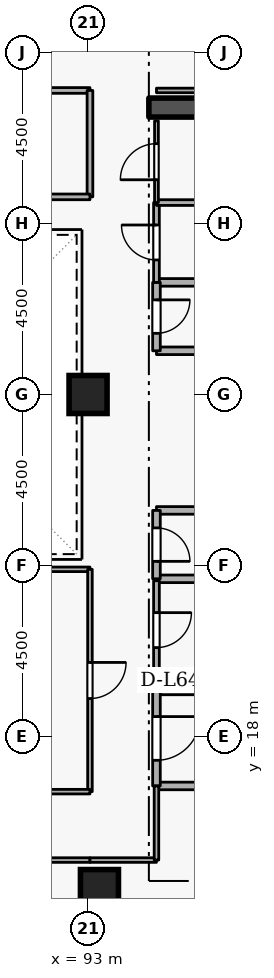
"""IFC4 building model, lengths in metres.
Left out: names, types, materials, properties, quantities, classifications, styles, units other than length and angle.
Written with IfcOpenShell. Run it as: python <this file> out.ifc"""

import sys

from ifc_helpers import new_model, si_unit, direction, frame, frame_2d, origin, origin_2d, place, context, subcontext, project, spatial, rectangle, extrude, element, fill, save


model = new_model("IFC4")
c1 = context("Model", 3, precision=1e-05, world=origin(), true_north=direction((0.0, 1.0)))
c2 = subcontext(c1, "Body", "Model", "MODEL_VIEW")
j1 = project(units=[si_unit("LENGTHUNIT", "METRE"), si_unit("PLANEANGLEUNIT", "RADIAN")], contexts=[c1])
p1 = place(None, origin())
s1 = spatial("IfcSite", under=j1, at=p1, CompositionType="ELEMENT")
p2 = place(p1, origin())
s2 = spatial("IfcBuilding", under=s1, at=p2, CompositionType="ELEMENT")
p3 = place(p2, frame((0.0, 0.0, 240.3)))
s3 = spatial("IfcBuildingStorey", under=s2, at=p3, CompositionType="ELEMENT", Elevation=240.3)
p4 = place(p3, frame((94.6, 34.55, 0.0), z_axis=(0.0, 0.0, 1.0), x_axis=(1.0, 0.0, 0.0)))
e1 = element("IfcWall", 1, at=p4, inside=s3, PredefinedType="SHEAR", context=c2, shape_type="SweptSolid", body=[
    extrude(rectangle(XDim=5.8, YDim=0.5, at=frame_2d((2.9, 0.0))), origin(), (0.0, 0.0, 1.0), 3.6),
])
for number, where, z_axis, x_axis in (
    (2, (93.3, 14.0, 0.0), (0.0, 0.0, 1.0), (1.0, 0.0, 0.0)),
    (3, (93.0, 27.0, 0.0), (0.0, 0.0, 1.0), (1.0, 0.0, 0.0)),
):
    element("IfcColumn", number, at=place(p3, frame(where, z_axis=z_axis, x_axis=x_axis)), inside=s3, PredefinedType="COLUMN", context=c2, shape_type="SweptSolid", body=[
        extrude(rectangle(XDim=1.0, YDim=1.0, at=origin_2d()), origin(), (0.0, 0.0, 1.0), 3.6),
    ])
p5 = place(p3, frame((94.8, 16.7, 0.0), z_axis=(0.0, 0.0, 1.0), x_axis=(1.0, 0.0, 0.0)))
e4 = element("IfcWall", 4, at=p5, inside=s3, PredefinedType="STANDARD", context=c2, shape_type="SweptSolid", body=[
    extrude(rectangle(XDim=5.7, YDim=0.2, at=frame_2d((2.85, 0.0))), origin(), (0.0, 0.0, 1.0), 3.34),
])
p6 = place(p3, frame((97.1, 19.2, 0.0), z_axis=(0.0, 0.0, 1.0), x_axis=(-1.0, 0.0, 0.0)))
e5 = element("IfcWall", 5, at=p6, inside=s3, PredefinedType="STANDARD", context=c2, shape_type="SweptSolid", body=[
    extrude(rectangle(XDim=2.3, YDim=0.2, at=frame_2d((1.15, 0.0))), origin(), (0.0, 0.0, 1.0), 2.545),
])
p7 = place(p3, frame((94.8, 19.2, 0.0), z_axis=(0.0, 0.0, 1.0), x_axis=(0.0, -1.0, 0.0)))
e6 = element("IfcWall", 6, at=p7, inside=s3, PredefinedType="STANDARD", context=c2, shape_type="SweptSolid", body=[
    extrude(rectangle(XDim=2.5, YDim=0.2, at=frame_2d((1.25, 0.0))), origin(), (0.0, 0.0, 1.0), 3.34),
])
p8 = place(p7, frame((0.675, 0.0, 0.0)))
e7 = element("IfcOpeningElement", 7, at=p8, cuts=e6, PredefinedType="OPENING", context=c2, shape_type="SweptSolid", body=[
    extrude(rectangle(XDim=1.15, YDim=2.1, at=frame_2d((0.575, 1.05))), frame((0.0, 0.11, 0.0), z_axis=(0.0, -1.0, 0.0), x_axis=(1.0, 0.0, 0.0)), (0.0, 0.0, 1.0), 0.22),
])
for number, where, z_axis, x_axis in (
    (8, (94.8, 28.15, 0.0), (0.0, 0.0, 1.0), (1.0, 0.0, 0.0)),
    (9, (96.85, 29.95, 0.0), (0.0, 0.0, 1.0), (-1.0, 0.0, 0.0)),
):
    element("IfcWall", number, at=place(p3, frame(where, z_axis=z_axis, x_axis=x_axis)), inside=s3, PredefinedType="STANDARD", context=c2, shape_type="SweptSolid", body=[
        extrude(rectangle(XDim=2.05, YDim=0.2, at=frame_2d((1.025, 0.0))), origin(), (0.0, 0.0, 1.0), 3.34),
    ])
p9 = place(p3, frame((94.8, 29.95, 0.0), z_axis=(0.0, 0.0, 1.0), x_axis=(0.0, -1.0, 0.0)))
e10 = element("IfcWall", 10, at=p9, inside=s3, PredefinedType="STANDARD", context=c2, shape_type="SweptSolid", body=[
    extrude(rectangle(XDim=1.8, YDim=0.2, at=frame_2d((0.9, 0.0))), origin(), (0.0, 0.0, 1.0), 3.34),
])
p10 = place(p9, frame((0.46, 0.0, 0.0)))
e11 = element("IfcOpeningElement", 11, at=p10, cuts=e10, PredefinedType="OPENING", context=c2, shape_type="SweptSolid", body=[
    extrude(rectangle(XDim=0.88, YDim=2.04, at=frame_2d((0.44, 1.02))), frame((0.0, 0.11, 0.0), z_axis=(0.0, -1.0, 0.0), x_axis=(1.0, 0.0, 0.0)), (0.0, 0.0, 1.0), 0.22),
])
for number, where, z_axis, x_axis in (
    (12, (94.8, 22.15, 0.0), (0.0, 0.0, 1.0), (1.0, 0.0, 0.0)),
    (13, (96.85, 23.95, 0.0), (0.0, 0.0, 1.0), (-1.0, 0.0, 0.0)),
):
    element("IfcWall", number, at=place(p3, frame(where, z_axis=z_axis, x_axis=x_axis)), inside=s3, PredefinedType="STANDARD", context=c2, shape_type="SweptSolid", body=[
        extrude(rectangle(XDim=2.05, YDim=0.2, at=frame_2d((1.025, 0.0))), origin(), (0.0, 0.0, 1.0), 3.34),
    ])
p11 = place(p3, frame((94.8, 23.95, 0.0), z_axis=(0.0, 0.0, 1.0), x_axis=(0.0, -1.0, 0.0)))
e14 = element("IfcWall", 14, at=p11, inside=s3, PredefinedType="STANDARD", context=c2, shape_type="SweptSolid", body=[
    extrude(rectangle(XDim=1.8, YDim=0.2, at=frame_2d((0.9, 0.0))), origin(), (0.0, 0.0, 1.0), 3.34),
])
p12 = place(p11, frame((0.46, 0.0, 0.0)))
e15 = element("IfcOpeningElement", 15, at=p12, cuts=e14, PredefinedType="OPENING", context=c2, shape_type="SweptSolid", body=[
    extrude(rectangle(XDim=0.88, YDim=2.04, at=frame_2d((0.44, 1.02))), frame((0.0, 0.11, 0.0), z_axis=(0.0, -1.0, 0.0), x_axis=(1.0, 0.0, 0.0)), (0.0, 0.0, 1.0), 0.22),
])
p13 = place(p3, frame((94.8, 19.5, 0.0), z_axis=(0.0, 0.0, 1.0), x_axis=(1.0, 0.0, 0.0)))
e16 = element("IfcWall", 16, at=p13, inside=s3, PredefinedType="PARTITIONING", context=c2, shape_type="SweptSolid", body=[
    extrude(rectangle(XDim=2.05, YDim=0.15, at=frame_2d((1.025, 0.0))), origin(), (0.0, 0.0, 1.0), 2.545),
])
p14 = place(p3, frame((94.8, 22.1, 0.0), z_axis=(0.0, 0.0, 1.0), x_axis=(0.0, -1.0, 0.0)))
e17 = element("IfcWall", 17, at=p14, inside=s3, PredefinedType="PARTITIONING", context=c2, shape_type="SweptSolid", body=[
    extrude(rectangle(XDim=2.6, YDim=0.15, at=frame_2d((1.3, 0.0))), origin(), (0.0, 0.0, 1.0), 3.34),
])
p15 = place(p14, frame((0.84, 0.0, 0.0)))
e18 = element("IfcOpeningElement", 18, at=p15, cuts=e17, PredefinedType="OPENING", context=c2, shape_type="SweptSolid", body=[
    extrude(rectangle(XDim=0.92, YDim=2.08, at=frame_2d((0.46, 1.04))), frame((0.0, 0.085, 0.0), z_axis=(0.0, -1.0, 0.0), x_axis=(1.0, 0.0, 0.0)), (0.0, 0.0, 1.0), 0.17),
])
p16 = place(p3, frame((94.8, 29.95, 0.0), z_axis=(0.0, 0.0, 1.0), x_axis=(0.0, 1.0, 0.0)))
e19 = element("IfcWall", 19, at=p16, inside=s3, PredefinedType="PARTITIONING", context=c2, shape_type="SweptSolid", body=[
    extrude(rectangle(XDim=2.1, YDim=0.15, at=frame_2d((1.05, 0.0))), origin(), (0.0, 0.0, 1.0), 3.34),
])
p17 = place(p16, frame((0.59, 0.0, 0.0)))
e20 = element("IfcOpeningElement", 20, at=p17, cuts=e19, PredefinedType="OPENING", context=c2, shape_type="SweptSolid", body=[
    extrude(rectangle(XDim=0.92, YDim=2.08, at=frame_2d((0.46, 1.04))), frame((0.0, 0.085, 0.0), z_axis=(0.0, -1.0, 0.0), x_axis=(1.0, 0.0, 0.0)), (0.0, 0.0, 1.0), 0.17),
])
p18 = place(p3, frame((94.8, 32.05, 0.0), z_axis=(0.0, 0.0, 1.0), x_axis=(1.0, 0.0, 0.0)))
e21 = element("IfcWall", 21, at=p18, inside=s3, PredefinedType="PARTITIONING", context=c2, shape_type="SweptSolid", body=[
    extrude(rectangle(XDim=2.05, YDim=0.15, at=frame_2d((1.025, 0.0))), origin(), (0.0, 0.0, 1.0), 3.34),
])
p19 = place(p3, frame((94.8, 32.05, 0.0), z_axis=(0.0, 0.0, 1.0), x_axis=(0.0, 1.0, 0.0)))
e22 = element("IfcWall", 22, at=p19, inside=s3, PredefinedType="PARTITIONING", context=c2, shape_type="SweptSolid", body=[
    extrude(rectangle(XDim=2.15, YDim=0.1, at=frame_2d((1.075, 0.0))), origin(), (0.0, 0.0, 1.0), 3.34),
])
p20 = place(p19, frame((0.6, 0.0, 0.0)))
e23 = element("IfcOpeningElement", 23, at=p20, cuts=e22, PredefinedType="OPENING", context=c2, shape_type="SweptSolid", body=[
    extrude(rectangle(XDim=0.95, YDim=2.1, at=frame_2d((0.475, 1.05))), frame((0.0, 0.06, 0.0), z_axis=(0.0, -1.0, 0.0), x_axis=(1.0, 0.0, 0.0)), (0.0, 0.0, 1.0), 0.12),
])
p21 = place(p3, frame((94.8, 35.0, 0.0), z_axis=(0.0, 0.0, 1.0), x_axis=(1.0, 0.0, 0.0)))
e24 = element("IfcWall", 24, at=p21, inside=s3, PredefinedType="PARTITIONING", context=c2, shape_type="SweptSolid", body=[
    extrude(rectangle(XDim=5.9, YDim=0.12, at=frame_2d((2.95, 0.0))), origin(), (0.0, 0.0, 1.0), 3.34),
])
p22 = place(p3, frame((87.3, 14.75, 0.0), z_axis=(0.0, 0.0, 1.0), x_axis=(1.0, 0.0, 0.0)))
e25 = element("IfcWall", 25, at=p22, inside=s3, PredefinedType="PARTITIONING", context=c2, shape_type="SweptSolid", body=[
    extrude(rectangle(XDim=5.75, YDim=0.12, at=frame_2d((2.875, 0.0))), origin(), (0.0, 0.0, 1.0), 3.34),
])
p23 = place(p22, frame((2.35, 0.0, 0.0)))
e26 = element("IfcOpeningElement", 26, at=p23, cuts=e25, PredefinedType="OPENING", context=c2, shape_type="SweptSolid", body=[
    extrude(rectangle(XDim=1.05, YDim=2.1, at=frame_2d((0.525, 1.05))), frame((0.0, 0.07, 0.0), z_axis=(0.0, -1.0, 0.0), x_axis=(1.0, 0.0, 0.0)), (0.0, 0.0, 1.0), 0.14),
])
p24 = place(p3, frame((93.05, 14.75, 0.0), z_axis=(0.0, 0.0, 1.0), x_axis=(1.0, 0.0, 0.0)))
e27 = element("IfcWall", 27, at=p24, inside=s3, PredefinedType="PARTITIONING", context=c2, shape_type="SweptSolid", body=[
    extrude(rectangle(XDim=1.75, YDim=0.12, at=frame_2d((0.875, 0.0))), origin(), (0.0, 0.0, 1.0), 3.34),
])
p25 = place(p3, frame((94.8, 14.75, 0.0), z_axis=(0.0, 0.0, 1.0), x_axis=(0.0, 1.0, 0.0)))
e28 = element("IfcWall", 28, at=p25, inside=s3, PredefinedType="PARTITIONING", context=c2, shape_type="SweptSolid", body=[
    extrude(rectangle(XDim=1.95, YDim=0.12, at=frame_2d((0.975, 0.0))), origin(), (0.0, 0.0, 1.0), 3.34),
])
p26 = place(p3, frame((87.3, 22.4, 0.0), z_axis=(0.0, 0.0, 1.0), x_axis=(1.0, 0.0, 0.0)))
e29 = element("IfcWall", 29, at=p26, inside=s3, PredefinedType="PARTITIONING", context=c2, shape_type="SweptSolid", body=[
    extrude(rectangle(XDim=5.75, YDim=0.12, at=frame_2d((2.875, 0.0))), origin(), (0.0, 0.0, 1.0), 3.34),
])
p27 = place(p3, frame((93.05, 22.4, 0.0), z_axis=(0.0, 0.0, 1.0), x_axis=(0.0, -1.0, 0.0)))
e30 = element("IfcWall", 30, at=p27, inside=s3, PredefinedType="PARTITIONING", context=c2, shape_type="SweptSolid", body=[
    extrude(rectangle(XDim=5.85, YDim=0.12, at=frame_2d((2.925, 0.0))), origin(), (0.0, 0.0, 1.0), 3.34),
])
p28 = place(p27, frame((2.45, 0.0, 0.0)))
e31 = element("IfcOpeningElement", 31, at=p28, cuts=e30, PredefinedType="OPENING", context=c2, shape_type="SweptSolid", body=[
    extrude(rectangle(XDim=0.95, YDim=2.1, at=frame_2d((0.475, 1.05))), frame((0.0, 0.07, 0.0), z_axis=(0.0, -1.0, 0.0), x_axis=(1.0, 0.0, 0.0)), (0.0, 0.0, 1.0), 0.14),
])
p29 = place(p3, frame((93.05, 16.55, 0.0), z_axis=(0.0, 0.0, 1.0), x_axis=(-1.0, 0.0, 0.0)))
e32 = element("IfcWall", 32, at=p29, inside=s3, PredefinedType="PARTITIONING", context=c2, shape_type="SweptSolid", body=[
    extrude(rectangle(XDim=5.75, YDim=0.12, at=frame_2d((2.875, 0.0))), origin(), (0.0, 0.0, 1.0), 3.34),
])
p30 = place(p3, frame((88.5, 35.0, 0.0), z_axis=(0.0, 0.0, 1.0), x_axis=(1.0, 0.0, 0.0)))
e33 = element("IfcWall", 33, at=p30, inside=s3, PredefinedType="PARTITIONING", context=c2, shape_type="SweptSolid", body=[
    extrude(rectangle(XDim=4.55, YDim=0.15, at=frame_2d((2.275, 0.0))), origin(), (0.0, 0.0, 1.0), 3.34),
])
p31 = place(p30, frame((1.625, 0.0, 0.0)))
e34 = element("IfcOpeningElement", 34, at=p31, cuts=e33, PredefinedType="OPENING", context=c2, shape_type="SweptSolid", body=[
    extrude(rectangle(XDim=1.3, YDim=2.12, at=frame_2d((0.65, 1.06))), frame((0.0, 0.085, 0.0), z_axis=(0.0, -1.0, 0.0), x_axis=(1.0, 0.0, 0.0)), (0.0, 0.0, 1.0), 0.17),
])
p32 = place(p3, frame((93.05, 35.0, 0.0), z_axis=(0.0, 0.0, 1.0), x_axis=(0.0, -1.0, 0.0)))
e35 = element("IfcWall", 35, at=p32, inside=s3, PredefinedType="PARTITIONING", context=c2, shape_type="SweptSolid", body=[
    extrude(rectangle(XDim=2.8, YDim=0.15, at=frame_2d((1.4, 0.0))), origin(), (0.0, 0.0, 1.0), 3.34),
])
p33 = place(p3, frame((93.05, 32.2, 0.0), z_axis=(0.0, 0.0, 1.0), x_axis=(-1.0, 0.0, 0.0)))
e36 = element("IfcWall", 36, at=p33, inside=s3, PredefinedType="PARTITIONING", context=c2, shape_type="SweptSolid", body=[
    extrude(rectangle(XDim=4.55, YDim=0.15, at=frame_2d((2.275, 0.0))), origin(), (0.0, 0.0, 1.0), 3.34),
])
p34 = place(p8, origin())
e37 = element("IfcDoor", 37, at=p34, inside=s3, OperationType="SINGLE_SWING_LEFT", PredefinedType="DOOR", context=c2, shape_type="SweptSolid", body=[
    extrude(rectangle(XDim=1.15, YDim=2.1, at=frame_2d((0.575, 1.05))), frame((0.0, 0.025, 0.0), z_axis=(0.0, -1.0, 0.0), x_axis=(1.0, 0.0, 0.0)), (0.0, 0.0, 1.0), 0.05),
])
fill(e7, e37)
p35 = place(p10, origin())
e38 = element("IfcDoor", 38, at=p35, inside=s3, OperationType="SINGLE_SWING_LEFT", PredefinedType="DOOR", context=c2, shape_type="SweptSolid", body=[
    extrude(rectangle(XDim=0.88, YDim=2.04, at=frame_2d((0.44, 1.02))), frame((0.0, 0.025, 0.0), z_axis=(0.0, -1.0, 0.0), x_axis=(1.0, 0.0, 0.0)), (0.0, 0.0, 1.0), 0.05),
])
fill(e11, e38)
p36 = place(p12, origin())
e39 = element("IfcDoor", 39, at=p36, inside=s3, OperationType="SINGLE_SWING_RIGHT", PredefinedType="DOOR", context=c2, shape_type="SweptSolid", body=[
    extrude(rectangle(XDim=0.88, YDim=2.04, at=frame_2d((0.44, 1.02))), frame((0.0, 0.025, 0.0), z_axis=(0.0, -1.0, 0.0), x_axis=(1.0, 0.0, 0.0)), (0.0, 0.0, 1.0), 0.05),
])
fill(e15, e39)
p37 = place(p15, origin())
e40 = element("IfcDoor", 40, at=p37, inside=s3, OperationType="SINGLE_SWING_LEFT", PredefinedType="DOOR", context=c2, shape_type="SweptSolid", body=[
    extrude(rectangle(XDim=0.92, YDim=2.08, at=frame_2d((0.46, 1.04))), frame((0.0, 0.025, 0.0), z_axis=(0.0, -1.0, 0.0), x_axis=(1.0, 0.0, 0.0)), (0.0, 0.0, 1.0), 0.05),
])
fill(e18, e40)
p38 = place(p17, origin())
e41 = element("IfcDoor", 41, at=p38, inside=s3, OperationType="SINGLE_SWING_RIGHT", PredefinedType="DOOR", context=c2, shape_type="SweptSolid", body=[
    extrude(rectangle(XDim=0.92, YDim=2.08, at=frame_2d((0.46, 1.04))), frame((0.0, 0.025, 0.0), z_axis=(0.0, -1.0, 0.0), x_axis=(1.0, 0.0, 0.0)), (0.0, 0.0, 1.0), 0.05),
])
fill(e20, e41)
p39 = place(p20, origin())
e42 = element("IfcDoor", 42, at=p39, inside=s3, OperationType="SINGLE_SWING_LEFT", PredefinedType="DOOR", context=c2, shape_type="SweptSolid", body=[
    extrude(rectangle(XDim=0.95, YDim=2.1, at=frame_2d((0.475, 1.05))), frame((0.0, 0.025, 0.0), z_axis=(0.0, -1.0, 0.0), x_axis=(1.0, 0.0, 0.0)), (0.0, 0.0, 1.0), 0.05),
])
fill(e23, e42)
p40 = place(p28, origin())
e43 = element("IfcDoor", 43, at=p40, inside=s3, OperationType="SINGLE_SWING_LEFT", PredefinedType="DOOR", context=c2, shape_type="SweptSolid", body=[
    extrude(rectangle(XDim=0.95, YDim=2.1, at=frame_2d((0.475, 1.05))), frame((0.0, 0.025, 0.0), z_axis=(0.0, -1.0, 0.0), x_axis=(1.0, 0.0, 0.0)), (0.0, 0.0, 1.0), 0.05),
])
fill(e31, e43)
save(model, sys.argv[1])
